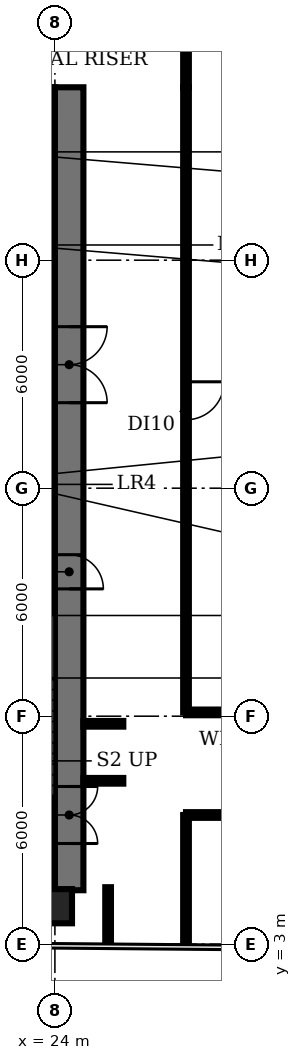
"""IFC4 building model, lengths in metres.
Left out: names, types, materials, properties, quantities, classifications, styles, units other than length and angle.
Written with IfcOpenShell. Run it as: python <this file> out.ifc"""

import sys

from ifc_helpers import new_model, si_unit, direction, frame, frame_2d, origin, origin_2d, place, context, subcontext, project, spatial, rectangle, extrude, element, fill, save


model = new_model("IFC4")
c1 = context("Model", 3, precision=1e-05, world=origin(), true_north=direction((0.0, 1.0)))
c2 = subcontext(c1, "Body", "Model", "MODEL_VIEW")
j1 = project(units=[si_unit("LENGTHUNIT", "METRE"), si_unit("PLANEANGLEUNIT", "RADIAN")], contexts=[c1])
p1 = place(None, origin())
s1 = spatial("IfcSite", under=j1, at=p1, CompositionType="ELEMENT")
p2 = place(p1, origin())
s2 = spatial("IfcBuilding", under=s1, at=p2, CompositionType="ELEMENT")
p3 = place(p2, frame((0.0, 0.0, 113.0)))
s3 = spatial("IfcBuildingStorey", under=s2, at=p3, CompositionType="ELEMENT", Elevation=113.0)
p4 = place(p3, frame((24.0, 4.0, 0.0), z_axis=(0.0, 0.0, 1.0), x_axis=(1.0, 0.0, 0.0)))
e1 = element("IfcColumn", 1, at=p4, inside=s3, PredefinedType="COLUMN", context=c2, shape_type="SweptSolid", body=[
    extrude(rectangle(XDim=0.9, YDim=0.9, at=origin_2d()), origin(), (0.0, 0.0, 1.0), 3.85),
])
p5 = place(p3, frame((20.85, 11.825, 0.0), z_axis=(0.0, 0.0, 1.0), x_axis=(1.0, 0.0, 0.0)))
e2 = element("IfcWall", 2, at=p5, inside=s3, PredefinedType="SHEAR", context=c2, shape_type="SweptSolid", body=[
    extrude(rectangle(XDim=3.15, YDim=0.25, at=frame_2d((1.575, 0.0))), origin(), (0.0, 0.0, 1.0), 3.85),
])
p6 = place(p3, frame((16.6, 13.7, 0.0), z_axis=(0.0, 0.0, 1.0), x_axis=(1.0, 0.0, 0.0)))
e3 = element("IfcWall", 3, at=p6, inside=s3, PredefinedType="PARTITIONING", context=c2, shape_type="SweptSolid", body=[
    extrude(rectangle(XDim=7.4, YDim=0.225, at=frame_2d((3.7, 0.0))), origin(), (0.0, 0.0, 1.0), 3.85),
])
p7 = place(p3, frame((9.4, 16.5, 0.0), z_axis=(0.0, 0.0, 1.0), x_axis=(1.0, 0.0, 0.0)))
e4 = element("IfcWall", 4, at=p7, inside=s3, PredefinedType="PARTITIONING", context=c2, shape_type="SweptSolid", body=[
    extrude(rectangle(XDim=14.6, YDim=0.225, at=frame_2d((7.3, 0.0))), origin(), (0.0, 0.0, 1.0), 3.85),
])
p8 = place(p7, frame((0.75, 0.0, 0.0)))
e5 = element("IfcOpeningElement", 5, at=p8, cuts=e4, PredefinedType="OPENING", context=c2, shape_type="SweptSolid", body=[
    extrude(rectangle(XDim=1.1, YDim=2.1, at=frame_2d((0.55, 1.05))), frame((0.0, 0.123, 0.0), z_axis=(0.0, -1.0, 0.0), x_axis=(1.0, 0.0, 0.0)), (0.0, 0.0, 1.0), 0.245),
])
p9 = place(p7, frame((3.55, 0.0, 0.0)))
e6 = element("IfcOpeningElement", 6, at=p9, cuts=e4, PredefinedType="OPENING", context=c2, shape_type="SweptSolid", body=[
    extrude(rectangle(XDim=1.1, YDim=2.1, at=frame_2d((0.55, 1.05))), frame((0.0, 0.123, 0.0), z_axis=(0.0, -1.0, 0.0), x_axis=(1.0, 0.0, 0.0)), (0.0, 0.0, 1.0), 0.245),
])
p10 = place(p7, frame((6.35, 0.0, 0.0)))
e7 = element("IfcOpeningElement", 7, at=p10, cuts=e4, PredefinedType="OPENING", context=c2, shape_type="SweptSolid", body=[
    extrude(rectangle(XDim=1.1, YDim=2.1, at=frame_2d((0.55, 1.05))), frame((0.0, 0.123, 0.0), z_axis=(0.0, -1.0, 0.0), x_axis=(1.0, 0.0, 0.0)), (0.0, 0.0, 1.0), 0.245),
])
p11 = place(p7, frame((9.15, 0.0, 0.0)))
e8 = element("IfcOpeningElement", 8, at=p11, cuts=e4, PredefinedType="OPENING", context=c2, shape_type="SweptSolid", body=[
    extrude(rectangle(XDim=1.1, YDim=2.1, at=frame_2d((0.55, 1.05))), frame((0.0, 0.123, 0.0), z_axis=(0.0, -1.0, 0.0), x_axis=(1.0, 0.0, 0.0)), (0.0, 0.0, 1.0), 0.245),
])
p12 = place(p7, frame((11.308, 0.0, 0.0)))
e9 = element("IfcOpeningElement", 9, at=p12, cuts=e4, PredefinedType="OPENING", context=c2, shape_type="SweptSolid", body=[
    extrude(rectangle(XDim=0.9, YDim=2.1, at=frame_2d((0.45, 1.05))), frame((0.0, 0.123, 0.0), z_axis=(0.0, -1.0, 0.0), x_axis=(1.0, 0.0, 0.0)), (0.0, 0.0, 1.0), 0.245),
])
p13 = place(p7, frame((13.083, 0.0, 0.0)))
e10 = element("IfcOpeningElement", 10, at=p13, cuts=e4, PredefinedType="OPENING", context=c2, shape_type="SweptSolid", body=[
    extrude(rectangle(XDim=0.9, YDim=2.1, at=frame_2d((0.45, 1.05))), frame((0.0, 0.123, 0.0), z_axis=(0.0, -1.0, 0.0), x_axis=(1.0, 0.0, 0.0)), (0.0, 0.0, 1.0), 0.245),
])
p14 = place(p3, frame((24.0, 20.0, 0.0), z_axis=(0.0, 0.0, 1.0), x_axis=(-1.0, 0.0, 0.0)))
e11 = element("IfcWall", 11, at=p14, inside=s3, PredefinedType="PARTITIONING", context=c2, shape_type="SweptSolid", body=[
    extrude(rectangle(XDim=14.6, YDim=0.225, at=frame_2d((7.3, 0.0))), origin(), (0.0, 0.0, 1.0), 3.85),
])
p15 = place(p14, frame((11.35, 0.0, 0.0)))
e12 = element("IfcOpeningElement", 12, at=p15, cuts=e11, PredefinedType="OPENING", context=c2, shape_type="SweptSolid", body=[
    extrude(rectangle(XDim=1.0, YDim=2.1, at=frame_2d((0.5, 1.05))), frame((0.0, 0.123, 0.0), z_axis=(0.0, -1.0, 0.0), x_axis=(1.0, 0.0, 0.0)), (0.0, 0.0, 1.0), 0.245),
])
p16 = place(p14, frame((5.775, 0.0, 0.0)))
e13 = element("IfcOpeningElement", 13, at=p16, cuts=e11, PredefinedType="OPENING", context=c2, shape_type="SweptSolid", body=[
    extrude(rectangle(XDim=1.0, YDim=2.1, at=frame_2d((0.5, 1.05))), frame((0.0, 0.123, 0.0), z_axis=(0.0, -1.0, 0.0), x_axis=(1.0, 0.0, 0.0)), (0.0, 0.0, 1.0), 0.245),
])
p17 = place(p14, frame((2.308, 0.0, 0.0)))
e14 = element("IfcOpeningElement", 14, at=p17, cuts=e11, PredefinedType="OPENING", context=c2, shape_type="SweptSolid", body=[
    extrude(rectangle(XDim=0.9, YDim=2.1, at=frame_2d((0.45, 1.05))), frame((0.0, 0.123, 0.0), z_axis=(0.0, -1.0, 0.0), x_axis=(1.0, 0.0, 0.0)), (0.0, 0.0, 1.0), 0.245),
])
p18 = place(p14, frame((0.532, 0.0, 0.0)))
e15 = element("IfcOpeningElement", 15, at=p18, cuts=e11, PredefinedType="OPENING", context=c2, shape_type="SweptSolid", body=[
    extrude(rectangle(XDim=0.9, YDim=2.1, at=frame_2d((0.45, 1.05))), frame((0.0, 0.123, 0.0), z_axis=(0.0, -1.0, 0.0), x_axis=(1.0, 0.0, 0.0)), (0.0, 0.0, 1.0), 0.245),
])
p19 = place(p3, frame((9.4, 22.8, 0.0), z_axis=(0.0, 0.0, 1.0), x_axis=(1.0, 0.0, 0.0)))
e16 = element("IfcWall", 16, at=p19, inside=s3, PredefinedType="PARTITIONING", context=c2, shape_type="SweptSolid", body=[
    extrude(rectangle(XDim=14.6, YDim=0.225, at=frame_2d((7.3, 0.0))), origin(), (0.0, 0.0, 1.0), 3.85),
])
p20 = place(p3, frame((24.375, 25.55, 0.0), z_axis=(0.0, 0.0, 1.0), x_axis=(0.0, -1.0, 0.0)))
e17 = element("IfcWall", 17, at=p20, inside=s3, PredefinedType="SHEAR", context=c2, shape_type="SweptSolid", body=[
    extrude(rectangle(XDim=21.13, YDim=0.75, at=frame_2d((10.565, 0.0))), origin(), (0.0, 0.0, 1.0), 3.85),
])
p21 = place(p20, frame((18.4, 0.0, 0.0)))
e18 = element("IfcOpeningElement", 18, at=p21, cuts=e17, PredefinedType="OPENING", context=c2, shape_type="SweptSolid", body=[
    extrude(rectangle(XDim=1.5, YDim=2.1, at=frame_2d((0.75, 1.05))), frame((0.0, 0.385, 0.0), z_axis=(0.0, -1.0, 0.0), x_axis=(1.0, 0.0, 0.0)), (0.0, 0.0, 1.0), 0.77),
])
p22 = place(p20, frame((12.3, 0.0, 0.0)))
e19 = element("IfcOpeningElement", 19, at=p22, cuts=e17, PredefinedType="OPENING", context=c2, shape_type="SweptSolid", body=[
    extrude(rectangle(XDim=0.9, YDim=2.1, at=frame_2d((0.45, 1.05))), frame((0.0, 0.385, 0.0), z_axis=(0.0, -1.0, 0.0), x_axis=(1.0, 0.0, 0.0)), (0.0, 0.0, 1.0), 0.77),
])
p23 = place(p20, frame((6.3, 0.0, 0.0)))
e20 = element("IfcOpeningElement", 20, at=p23, cuts=e17, PredefinedType="OPENING", context=c2, shape_type="SweptSolid", body=[
    extrude(rectangle(XDim=2.0, YDim=2.1, at=frame_2d((1.0, 1.05))), frame((0.0, 0.385, 0.0), z_axis=(0.0, -1.0, 0.0), x_axis=(1.0, 0.0, 0.0)), (0.0, 0.0, 1.0), 0.77),
])
p24 = place(p3, frame((24.0, 5.025, 0.0), z_axis=(0.0, 0.0, 1.0), x_axis=(-1.0, 0.0, 0.0)))
e21 = element("IfcWall", 21, at=p24, inside=s3, PredefinedType="SHEAR", context=c2, shape_type="SweptSolid", body=[
    extrude(rectangle(XDim=18.0, YDim=0.75, at=frame_2d((9.0, 0.0))), origin(), (0.0, 0.0, 1.0), 3.85),
])
p25 = place(p24, frame((0.825, 0.0, 0.0)))
e22 = element("IfcOpeningElement", 22, at=p25, cuts=e21, PredefinedType="OPENING", context=c2, shape_type="SweptSolid", body=[
    extrude(rectangle(XDim=1.5, YDim=2.1, at=frame_2d((0.75, 1.05))), frame((0.0, 0.385, 0.0), z_axis=(0.0, -1.0, 0.0), x_axis=(1.0, 0.0, 0.0)), (0.0, 0.0, 1.0), 0.77),
])
p26 = place(p24, frame((15.675, 0.0, 0.0)))
e23 = element("IfcOpeningElement", 23, at=p26, cuts=e21, PredefinedType="OPENING", context=c2, shape_type="SweptSolid", body=[
    extrude(rectangle(XDim=1.5, YDim=2.1, at=frame_2d((0.75, 1.05))), frame((0.0, 0.385, 0.0), z_axis=(0.0, -1.0, 0.0), x_axis=(1.0, 0.0, 0.0)), (0.0, 0.0, 1.0), 0.77),
])
p27 = place(p24, frame((13.0, 0.0, 0.0)))
e24 = element("IfcOpeningElement", 24, at=p27, cuts=e21, PredefinedType="OPENING", context=c2, shape_type="SweptSolid", body=[
    extrude(rectangle(XDim=1.2, YDim=2.1, at=frame_2d((0.6, 1.05))), frame((0.0, 0.385, 0.0), z_axis=(0.0, -1.0, 0.0), x_axis=(1.0, 0.0, 0.0)), (0.0, 0.0, 1.0), 0.77),
])
p28 = place(p24, frame((4.35, 0.0, 0.0)))
e25 = element("IfcOpeningElement", 25, at=p28, cuts=e21, PredefinedType="OPENING", context=c2, shape_type="SweptSolid", body=[
    extrude(rectangle(XDim=1.0, YDim=2.1, at=frame_2d((0.5, 1.05))), frame((0.0, 0.385, 0.0), z_axis=(0.0, -1.0, 0.0), x_axis=(1.0, 0.0, 0.0)), (0.0, 0.0, 1.0), 0.77),
])
p29 = place(p3, frame((6.0, 25.175, 0.0), z_axis=(0.0, 0.0, 1.0), x_axis=(1.0, 0.0, 0.0)))
e26 = element("IfcWall", 26, at=p29, inside=s3, PredefinedType="SHEAR", context=c2, shape_type="SweptSolid", body=[
    extrude(rectangle(XDim=18.0, YDim=0.75, at=frame_2d((9.0, 0.0))), origin(), (0.0, 0.0, 1.0), 3.85),
])
for number, where, z_axis, x_axis in (
    (27, (24.75, 7.3, 0.0), (0.0, 0.0, 1.0), (1.0, 0.0, 0.0)),
    (28, (24.75, 8.8, 0.0), (0.0, 0.0, 1.0), (1.0, 0.0, 0.0)),
):
    element("IfcWall", number, at=place(p3, frame(where, z_axis=z_axis, x_axis=x_axis)), inside=s3, PredefinedType="PARTITIONING", context=c2, shape_type="SweptSolid", body=[
        extrude(rectangle(XDim=1.05, YDim=0.15, at=frame_2d((0.525, 0.0))), origin(), (0.0, 0.0, 1.0), 2.83),
    ])
p30 = place(p3, frame((25.4, 3.0, 0.0), z_axis=(0.0, 0.0, 1.0), x_axis=(0.0, 1.0, 0.0)))
e29 = element("IfcWall", 29, at=p30, inside=s3, PredefinedType="PARTITIONING", context=c2, shape_type="SweptSolid", body=[
    extrude(rectangle(XDim=1.5, YDim=0.15, at=frame_2d((0.75, 0.0))), origin(), (0.0, 0.0, 1.0), 2.83),
])
p31 = place(p3, frame((27.45, 2.98, 0.0), z_axis=(0.0, 0.0, 1.0), x_axis=(0.0, 1.0, 0.0)))
e30 = element("IfcWall", 30, at=p31, inside=s3, PredefinedType="PARTITIONING", context=c2, shape_type="SweptSolid", body=[
    extrude(rectangle(XDim=3.42, YDim=0.15, at=frame_2d((1.71, 0.0))), origin(), (0.0, 0.0, 1.0), 2.83),
])
p32 = place(p3, frame((27.45, 9.1, 0.0), z_axis=(0.0, 0.0, 1.0), x_axis=(1.0, 0.0, 0.0)))
e31 = element("IfcWall", 31, at=p32, inside=s3, PredefinedType="PARTITIONING", context=c2, shape_type="SweptSolid", body=[
    extrude(rectangle(XDim=8.55, YDim=0.15, at=frame_2d((4.275, 0.0))), origin(), (0.0, 0.0, 1.0), 2.83),
])
p33 = place(p3, frame((27.45, 25.55, 0.0), z_axis=(0.0, 0.0, 1.0), x_axis=(0.0, -1.0, 0.0)))
e32 = element("IfcWall", 32, at=p33, inside=s3, PredefinedType="PARTITIONING", context=c2, shape_type="SweptSolid", body=[
    extrude(rectangle(XDim=16.45, YDim=0.15, at=frame_2d((8.225, 0.0))), origin(), (0.0, 0.0, 1.0), 2.83),
])
p34 = place(p33, frame((7.75, 0.0, 0.0)))
e33 = element("IfcOpeningElement", 33, at=p34, cuts=e32, PredefinedType="OPENING", context=c2, shape_type="SweptSolid", body=[
    extrude(rectangle(XDim=1.0, YDim=2.1, at=frame_2d((0.5, 1.05))), frame((0.0, 0.085, 0.0), z_axis=(0.0, -1.0, 0.0), x_axis=(1.0, 0.0, 0.0)), (0.0, 0.0, 1.0), 0.17),
])
p35 = place(p3, frame((27.45, 25.55, 0.0), z_axis=(0.0, 0.0, 1.0), x_axis=(0.0, 1.0, 0.0)))
e34 = element("IfcWall", 34, at=p35, inside=s3, PredefinedType="PARTITIONING", context=c2, shape_type="SweptSolid", body=[
    extrude(rectangle(XDim=3.9, YDim=0.15, at=frame_2d((1.95, 0.0))), origin(), (0.0, 0.0, 1.0), 2.83),
])
p36 = place(p3, frame((42.0, 6.4, 0.0), z_axis=(0.0, 0.0, 1.0), x_axis=(-1.0, 0.0, 0.0)))
e35 = element("IfcWall", 35, at=p36, inside=s3, PredefinedType="PARTITIONING", context=c2, shape_type="SweptSolid", body=[
    extrude(rectangle(XDim=14.55, YDim=0.15, at=frame_2d((7.275, 0.0))), origin(), (0.0, 0.0, 1.0), 2.83),
])
p37 = place(p36, frame((7.45, 0.0, 0.0)))
e36 = element("IfcOpeningElement", 36, at=p37, cuts=e35, PredefinedType="OPENING", context=c2, shape_type="SweptSolid", body=[
    extrude(rectangle(XDim=1.2, YDim=2.1, at=frame_2d((0.6, 1.05))), frame((0.0, 0.085, 0.0), z_axis=(0.0, -1.0, 0.0), x_axis=(1.0, 0.0, 0.0)), (0.0, 0.0, 1.0), 0.17),
])
p38 = place(p21, origin())
e37 = element("IfcDoor", 37, at=p38, inside=s3, OperationType="DOUBLE_DOOR_SINGLE_SWING", PredefinedType="DOOR", context=c2, shape_type="SweptSolid", body=[
    extrude(rectangle(XDim=1.5, YDim=2.1, at=frame_2d((0.75, 1.05))), frame((0.0, 0.025, 0.0), z_axis=(0.0, -1.0, 0.0), x_axis=(1.0, 0.0, 0.0)), (0.0, 0.0, 1.0), 0.05),
])
fill(e18, e37)
p39 = place(p22, origin())
e38 = element("IfcDoor", 38, at=p39, inside=s3, OperationType="SINGLE_SWING_RIGHT", PredefinedType="DOOR", context=c2, shape_type="SweptSolid", body=[
    extrude(rectangle(XDim=0.9, YDim=2.1, at=frame_2d((0.45, 1.05))), frame((0.0, -0.315, 0.0), z_axis=(0.0, -1.0, 0.0), x_axis=(1.0, 0.0, 0.0)), (0.0, 0.0, 1.0), 0.05),
])
fill(e19, e38)
p40 = place(p23, origin())
e39 = element("IfcDoor", 39, at=p40, inside=s3, OperationType="DOUBLE_DOOR_SINGLE_SWING", PredefinedType="DOOR", context=c2, shape_type="SweptSolid", body=[
    extrude(rectangle(XDim=2.0, YDim=2.1, at=frame_2d((1.0, 1.05))), frame((0.0, 0.025, 0.0), z_axis=(0.0, -1.0, 0.0), x_axis=(1.0, 0.0, 0.0)), (0.0, 0.0, 1.0), 0.05),
])
fill(e20, e39)
p41 = place(p34, origin())
e40 = element("IfcDoor", 40, at=p41, inside=s3, OperationType="SINGLE_SWING_LEFT", PredefinedType="DOOR", context=c2, shape_type="SweptSolid", body=[
    extrude(rectangle(XDim=1.0, YDim=2.1, at=frame_2d((0.5, 1.05))), frame((0.0, 0.025, 0.0), z_axis=(0.0, -1.0, 0.0), x_axis=(1.0, 0.0, 0.0)), (0.0, 0.0, 1.0), 0.05),
])
fill(e33, e40)
save(model, sys.argv[1])
